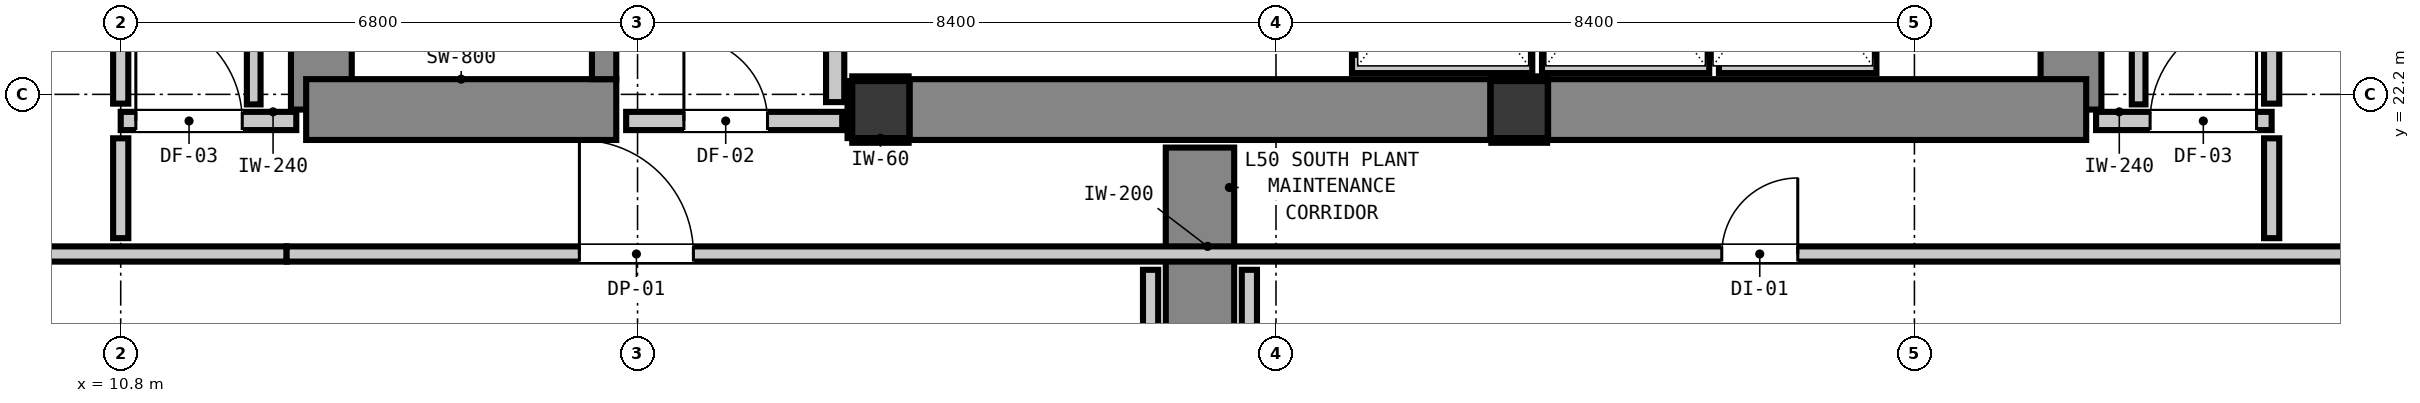
"""IFC4 building model, lengths in metres.
Left out: names, types, materials, properties, quantities, classifications, styles, units other than length and angle.
Written with IfcOpenShell. Run it as: python <this file> out.ifc"""

import sys

from ifc_helpers import new_model, si_unit, direction, frame, frame_2d, origin, origin_2d, place, context, subcontext, project, spatial, rectangle, extrude, element, fill, save


model = new_model("IFC4")
c1 = context("Model", 3, precision=1e-05, world=origin(), true_north=direction((0.0, 1.0)))
c2 = subcontext(c1, "Body", "Model", "MODEL_VIEW")
j1 = project(units=[si_unit("LENGTHUNIT", "METRE"), si_unit("PLANEANGLEUNIT", "RADIAN")], contexts=[c1])
p1 = place(None, origin())
s1 = spatial("IfcSite", under=j1, at=p1, CompositionType="ELEMENT")
p2 = place(p1, origin())
s2 = spatial("IfcBuilding", under=s1, at=p2, CompositionType="ELEMENT")
p3 = place(p2, frame((0.0, 0.0, 172.48)))
s3 = spatial("IfcBuildingStorey", under=s2, at=p3, CompositionType="ELEMENT", Elevation=172.48)
for number, where, z_axis, x_axis in (
    (1, (20.8, 22.0, 0.0), (0.0, 0.0, 1.0), (1.0, 0.0, 0.0)),
    (2, (29.2, 22.0, 0.0), (0.0, 0.0, 1.0), (1.0, 0.0, 0.0)),
):
    element("IfcColumn", number, at=place(p3, frame(where, z_axis=z_axis, x_axis=x_axis)), inside=s3, PredefinedType="COLUMN", context=c2, shape_type="SweptSolid", body=[
        extrude(rectangle(XDim=0.75, YDim=0.75, at=origin_2d()), origin(), (0.0, 0.0, 1.0), 4.4),
    ])
p4 = place(p3, frame((13.44, 22.0, 0.0), z_axis=(0.0, 0.0, 1.0), x_axis=(0.0, 1.0, 0.0)))
e3 = element("IfcWall", 3, at=p4, inside=s3, PredefinedType="SHEAR", context=c2, shape_type="SweptSolid", body=[
    extrude(rectangle(XDim=8.32, YDim=0.8, at=frame_2d((4.16, 0.0))), origin(), (0.0, 0.0, 1.0), 4.4),
])
p5 = place(p3, frame((13.24, 22.0, 0.0), z_axis=(0.0, 0.0, 1.0), x_axis=(1.0, 0.0, 0.0)))
e4 = element("IfcWall", 4, at=p5, inside=s3, PredefinedType="SHEAR", context=c2, shape_type="SweptSolid", body=[
    extrude(rectangle(XDim=4.08, YDim=0.8, at=frame_2d((2.04, 0.0))), origin(), (0.0, 0.0, 1.0), 4.4),
])
p6 = place(p3, frame((36.46, 22.0, 0.0), z_axis=(0.0, 0.0, 1.0), x_axis=(0.0, 1.0, 0.0)))
e5 = element("IfcWall", 5, at=p6, inside=s3, PredefinedType="SHEAR", context=c2, shape_type="SweptSolid", body=[
    extrude(rectangle(XDim=8.32, YDim=0.8, at=frame_2d((4.16, 0.0))), origin(), (0.0, 0.0, 1.0), 4.4),
])
p7 = place(p3, frame((29.58, 22.0, 0.0), z_axis=(0.0, 0.0, 1.0), x_axis=(1.0, 0.0, 0.0)))
e6 = element("IfcWall", 6, at=p7, inside=s3, PredefinedType="SHEAR", context=c2, shape_type="SweptSolid", body=[
    extrude(rectangle(XDim=7.08, YDim=0.8, at=frame_2d((3.54, 0.0))), origin(), (0.0, 0.0, 1.0), 4.4),
])
p8 = place(p3, frame((21.18, 22.0, 0.0), z_axis=(0.0, 0.0, 1.0), x_axis=(1.0, 0.0, 0.0)))
e7 = element("IfcWall", 7, at=p8, inside=s3, PredefinedType="SHEAR", context=c2, shape_type="SweptSolid", body=[
    extrude(rectangle(XDim=7.64, YDim=0.8, at=frame_2d((3.82, 0.0))), origin(), (0.0, 0.0, 1.0), 4.4),
])
p9 = place(p3, frame((17.16, 22.4, 0.0), z_axis=(0.0, 0.0, 1.0), x_axis=(0.0, 1.0, 0.0)))
e8 = element("IfcWall", 8, at=p9, inside=s3, PredefinedType="SHEAR", context=c2, shape_type="SweptSolid", body=[
    extrude(rectangle(XDim=8.0, YDim=0.32, at=frame_2d((4.0, 0.0))), origin(), (0.0, 0.0, 1.0), 4.4),
])
p10 = place(p9, frame((0.39, 0.0, 0.0)))
e9 = element("IfcOpeningElement", 9, at=p10, cuts=e8, PredefinedType="OPENING", context=c2, shape_type="SweptSolid", body=[
    extrude(rectangle(XDim=1.1, YDim=2.15, at=frame_2d((0.55, 1.075))), frame((0.0, 0.17, 0.0), z_axis=(0.0, -1.0, 0.0), x_axis=(1.0, 0.0, 0.0)), (0.0, 0.0, 1.0), 0.34),
])
p11 = place(p3, frame((25.0, 16.45, 0.0), z_axis=(0.0, 0.0, 1.0), x_axis=(0.0, 1.0, 0.0)))
e10 = element("IfcWall", 10, at=p11, inside=s3, PredefinedType="SHEAR", context=c2, shape_type="SweptSolid", body=[
    extrude(rectangle(XDim=5.05, YDim=0.9, at=frame_2d((2.525, 0.0))), origin(), (0.0, 0.0, 1.0), 4.16),
])
p12 = place(p3, frame((29.5, 22.6, 0.0), z_axis=(0.0, 0.0, 1.0), x_axis=(1.0, 0.0, 0.0)))
e11 = element("IfcWall", 11, at=p12, inside=s3, PredefinedType="PARTITIONING", context=c2, shape_type="SweptSolid", body=[
    extrude(rectangle(XDim=2.2, YDim=0.24, at=frame_2d((1.1, 0.0))), origin(), (0.0, 0.0, 1.0), 4.16),
])
p13 = place(p3, frame((31.828, 22.6, 0.0), z_axis=(0.0, 0.0, 1.0), x_axis=(1.0, 0.0, 0.0)))
e12 = element("IfcWall", 12, at=p13, inside=s3, PredefinedType="PARTITIONING", context=c2, shape_type="SweptSolid", body=[
    extrude(rectangle(XDim=2.072, YDim=0.24, at=frame_2d((1.036, 0.0))), origin(), (0.0, 0.0, 1.0), 4.16),
])
p14 = place(p3, frame((27.0, 22.6, 0.0), z_axis=(0.0, 0.0, 1.0), x_axis=(1.0, 0.0, 0.0)))
e13 = element("IfcWall", 13, at=p14, inside=s3, PredefinedType="PARTITIONING", context=c2, shape_type="SweptSolid", body=[
    extrude(rectangle(XDim=2.372, YDim=0.24, at=frame_2d((1.186, 0.0))), origin(), (0.0, 0.0, 1.0), 4.16),
])
p15 = place(p3, frame((10.8, 21.85, 0.0), z_axis=(0.0, 0.0, 1.0), x_axis=(1.0, 0.0, 0.0)))
e14 = element("IfcWall", 14, at=p15, inside=s3, PredefinedType="PARTITIONING", context=c2, shape_type="SweptSolid", body=[
    extrude(rectangle(XDim=2.31, YDim=0.24, at=frame_2d((1.155, 0.0))), origin(), (0.0, 0.0, 1.0), 3.842),
])
p16 = place(p15, frame((0.199, 0.0, 0.0)))
e15 = element("IfcOpeningElement", 15, at=p16, cuts=e14, PredefinedType="OPENING", context=c2, shape_type="SweptSolid", body=[
    extrude(rectangle(XDim=1.4, YDim=2.15, at=frame_2d((0.7, 1.075))), frame((0.0, 0.13, 0.0), z_axis=(0.0, -1.0, 0.0), x_axis=(1.0, 0.0, 0.0)), (0.0, 0.0, 1.0), 0.26),
])
p17 = place(p3, frame((17.45, 21.85, 0.0), z_axis=(0.0, 0.0, 1.0), x_axis=(1.0, 0.0, 0.0)))
e16 = element("IfcWall", 16, at=p17, inside=s3, PredefinedType="PARTITIONING", context=c2, shape_type="SweptSolid", body=[
    extrude(rectangle(XDim=2.843, YDim=0.24, at=frame_2d((1.421, 0.0))), origin(), (0.0, 0.0, 1.0), 3.842),
])
p18 = place(p17, frame((0.76, 0.0, 0.0)))
e17 = element("IfcOpeningElement", 17, at=p18, cuts=e16, PredefinedType="OPENING", context=c2, shape_type="SweptSolid", body=[
    extrude(rectangle(XDim=1.1, YDim=2.15, at=frame_2d((0.55, 1.075))), frame((0.0, 0.13, 0.0), z_axis=(0.0, -1.0, 0.0), x_axis=(1.0, 0.0, 0.0)), (0.0, 0.0, 1.0), 0.26),
])
p19 = place(p3, frame((36.79, 21.85, 0.0), z_axis=(0.0, 0.0, 1.0), x_axis=(1.0, 0.0, 0.0)))
e18 = element("IfcWall", 18, at=p19, inside=s3, PredefinedType="PARTITIONING", context=c2, shape_type="SweptSolid", body=[
    extrude(rectangle(XDim=2.31, YDim=0.24, at=frame_2d((1.155, 0.0))), origin(), (0.0, 0.0, 1.0), 3.842),
])
p20 = place(p19, frame((0.711, 0.0, 0.0)))
e19 = element("IfcOpeningElement", 19, at=p20, cuts=e18, PredefinedType="OPENING", context=c2, shape_type="SweptSolid", body=[
    extrude(rectangle(XDim=1.4, YDim=2.15, at=frame_2d((0.7, 1.075))), frame((0.0, 0.13, 0.0), z_axis=(0.0, -1.0, 0.0), x_axis=(1.0, 0.0, 0.0)), (0.0, 0.0, 1.0), 0.26),
])
p21 = place(p3, frame((4.35, 20.1, 0.0), z_axis=(0.0, 0.0, 1.0), x_axis=(1.0, 0.0, 0.0)))
e20 = element("IfcWall", 20, at=p21, inside=s3, PredefinedType="PARTITIONING", context=c2, shape_type="SweptSolid", body=[
    extrude(rectangle(XDim=8.633, YDim=0.2, at=frame_2d((4.316, 0.0))), origin(), (0.0, 0.0, 1.0), 3.645),
])
p22 = place(p3, frame((12.983, 20.1, 0.0), z_axis=(0.0, 0.0, 1.0), x_axis=(1.0, 0.0, 0.0)))
e21 = element("IfcWall", 21, at=p22, inside=s3, PredefinedType="PARTITIONING", context=c2, shape_type="SweptSolid", body=[
    extrude(rectangle(XDim=28.467, YDim=0.2, at=frame_2d((14.233, 0.0))), origin(), (0.0, 0.0, 1.0), 4.16),
])
p23 = place(p22, frame((18.882, 0.0, 0.0)))
e22 = element("IfcOpeningElement", 22, at=p23, cuts=e21, PredefinedType="OPENING", context=c2, shape_type="SweptSolid", body=[
    extrude(rectangle(XDim=1.0, YDim=2.15, at=frame_2d((0.5, 1.075))), frame((0.0, 0.11, 0.0), z_axis=(0.0, -1.0, 0.0), x_axis=(1.0, 0.0, 0.0)), (0.0, 0.0, 1.0), 0.22),
])
p24 = place(p22, frame((3.852, 0.0, 0.0)))
e23 = element("IfcOpeningElement", 23, at=p24, cuts=e21, PredefinedType="OPENING", context=c2, shape_type="SweptSolid", body=[
    extrude(rectangle(XDim=1.5, YDim=2.15, at=frame_2d((0.75, 1.075))), frame((0.0, 0.11, 0.0), z_axis=(0.0, -1.0, 0.0), x_axis=(1.0, 0.0, 0.0)), (0.0, 0.0, 1.0), 0.22),
])
p25 = place(p3, frame((20.2, 22.098, 0.0), z_axis=(0.0, 0.0, 1.0), x_axis=(0.0, 1.0, 0.0)))
e24 = element("IfcWall", 24, at=p25, inside=s3, PredefinedType="PARTITIONING", context=c2, shape_type="SweptSolid", body=[
    extrude(rectangle(XDim=6.054, YDim=0.24, at=frame_2d((3.027, 0.0))), origin(), (0.0, 0.0, 1.0), 4.16),
])
p26 = place(p3, frame((10.8, 20.308, 0.0), z_axis=(0.0, 0.0, 1.0), x_axis=(0.0, 1.0, 0.0)))
e25 = element("IfcWall", 25, at=p26, inside=s3, PredefinedType="PARTITIONING", context=c2, shape_type="SweptSolid", body=[
    extrude(rectangle(XDim=1.314, YDim=0.2, at=frame_2d((0.657, 0.0))), origin(), (0.0, 0.0, 1.0), 4.16),
])
p27 = place(p3, frame((10.8, 22.078, 0.0), z_axis=(0.0, 0.0, 1.0), x_axis=(0.0, 1.0, 0.0)))
e26 = element("IfcWall", 26, at=p27, inside=s3, PredefinedType="PARTITIONING", context=c2, shape_type="SweptSolid", body=[
    extrude(rectangle(XDim=0.914, YDim=0.2, at=frame_2d((0.457, 0.0))), origin(), (0.0, 0.0, 1.0), 4.16),
])
for number, where, z_axis, x_axis in (
    (27, (24.35, 16.758, 0.0), (0.0, 0.0, 1.0), (0.0, 1.0, 0.0)),
    (28, (25.65, 16.758, 0.0), (0.0, 0.0, 1.0), (0.0, 1.0, 0.0)),
):
    element("IfcWall", number, at=place(p3, frame(where, z_axis=z_axis, x_axis=x_axis)), inside=s3, PredefinedType="PARTITIONING", context=c2, shape_type="SweptSolid", body=[
        extrude(rectangle(XDim=3.134, YDim=0.2, at=frame_2d((1.567, 0.0))), origin(), (0.0, 0.0, 1.0), 4.16),
    ])
p28 = place(p3, frame((39.1, 20.308, 0.0), z_axis=(0.0, 0.0, 1.0), x_axis=(0.0, 1.0, 0.0)))
e29 = element("IfcWall", 29, at=p28, inside=s3, PredefinedType="PARTITIONING", context=c2, shape_type="SweptSolid", body=[
    extrude(rectangle(XDim=1.314, YDim=0.2, at=frame_2d((0.657, 0.0))), origin(), (0.0, 0.0, 1.0), 4.16),
])
p29 = place(p3, frame((39.1, 22.078, 0.0), z_axis=(0.0, 0.0, 1.0), x_axis=(0.0, 1.0, 0.0)))
e30 = element("IfcWall", 30, at=p29, inside=s3, PredefinedType="PARTITIONING", context=c2, shape_type="SweptSolid", body=[
    extrude(rectangle(XDim=0.914, YDim=0.2, at=frame_2d((0.457, 0.0))), origin(), (0.0, 0.0, 1.0), 4.16),
])
for number, where, z_axis, x_axis in (
    (31, (12.55, 22.068, 0.0), (0.0, 0.0, 1.0), (0.0, 1.0, 0.0)),
    (32, (37.35, 22.068, 0.0), (0.0, 0.0, 1.0), (0.0, 1.0, 0.0)),
):
    element("IfcWall", number, at=place(p3, frame(where, z_axis=z_axis, x_axis=x_axis)), inside=s3, PredefinedType="PARTITIONING", context=c2, shape_type="SweptSolid", body=[
        extrude(rectangle(XDim=17.294, YDim=0.18, at=frame_2d((8.647, 0.0))), origin(), (0.0, 0.0, 1.0), 4.16),
    ])
for number, where, z_axis, x_axis in (
    (33, (20.425, 21.593, 0.0), (0.0, 0.0, 1.0), (1.0, 0.0, 0.0)),
    (34, (20.425, 22.407, 0.0), (0.0, 0.0, 1.0), (1.0, 0.0, 0.0)),
):
    element("IfcWall", number, at=place(p3, frame(where, z_axis=z_axis, x_axis=x_axis)), inside=s3, PredefinedType="PARTITIONING", context=c2, shape_type="SweptSolid", body=[
        extrude(rectangle(XDim=0.742, YDim=0.06, at=frame_2d((0.371, 0.0))), origin(), (0.0, 0.0, 1.0), 1.45),
    ])
p30 = place(p3, frame((20.393, 21.625, 0.0), z_axis=(0.0, 0.0, 1.0), x_axis=(0.0, 1.0, 0.0)))
e35 = element("IfcWall", 35, at=p30, inside=s3, PredefinedType="PARTITIONING", context=c2, shape_type="SweptSolid", body=[
    extrude(rectangle(XDim=0.75, YDim=0.06, at=frame_2d((0.375, 0.0))), origin(), (0.0, 0.0, 1.0), 1.45),
])
for number, where, z_axis, x_axis in (
    (36, (28.833, 21.593, 0.0), (0.0, 0.0, 1.0), (1.0, 0.0, 0.0)),
    (37, (28.833, 22.407, 0.0), (0.0, 0.0, 1.0), (1.0, 0.0, 0.0)),
):
    element("IfcWall", number, at=place(p3, frame(where, z_axis=z_axis, x_axis=x_axis)), inside=s3, PredefinedType="PARTITIONING", context=c2, shape_type="SweptSolid", body=[
        extrude(rectangle(XDim=0.734, YDim=0.06, at=frame_2d((0.367, 0.0))), origin(), (0.0, 0.0, 1.0), 1.45),
    ])
p31 = place(p18, origin())
e38 = element("IfcDoor", 38, at=p31, inside=s3, OperationType="SINGLE_SWING_LEFT", PredefinedType="DOOR", context=c2, shape_type="SweptSolid", body=[
    extrude(rectangle(XDim=1.1, YDim=2.15, at=frame_2d((0.55, 1.075))), frame((0.0, 0.025, 0.0), z_axis=(0.0, -1.0, 0.0), x_axis=(1.0, 0.0, 0.0)), (0.0, 0.0, 1.0), 0.05),
])
fill(e17, e38)
p32 = place(p16, origin())
e39 = element("IfcDoor", 39, at=p32, inside=s3, OperationType="SINGLE_SWING_LEFT", PredefinedType="DOOR", context=c2, shape_type="SweptSolid", body=[
    extrude(rectangle(XDim=1.4, YDim=2.15, at=frame_2d((0.7, 1.075))), frame((0.0, 0.025, 0.0), z_axis=(0.0, -1.0, 0.0), x_axis=(1.0, 0.0, 0.0)), (0.0, 0.0, 1.0), 0.05),
])
fill(e15, e39)
p33 = place(p20, origin())
e40 = element("IfcDoor", 40, at=p33, inside=s3, OperationType="SINGLE_SWING_RIGHT", PredefinedType="DOOR", context=c2, shape_type="SweptSolid", body=[
    extrude(rectangle(XDim=1.4, YDim=2.15, at=frame_2d((0.7, 1.075))), frame((0.0, 0.025, 0.0), z_axis=(0.0, -1.0, 0.0), x_axis=(1.0, 0.0, 0.0)), (0.0, 0.0, 1.0), 0.05),
])
fill(e19, e40)
p34 = place(p23, origin())
e41 = element("IfcDoor", 41, at=p34, inside=s3, OperationType="SINGLE_SWING_RIGHT", PredefinedType="DOOR", context=c2, shape_type="SweptSolid", body=[
    extrude(rectangle(XDim=1.0, YDim=2.15, at=frame_2d((0.5, 1.075))), frame((0.0, 0.025, 0.0), z_axis=(0.0, -1.0, 0.0), x_axis=(1.0, 0.0, 0.0)), (0.0, 0.0, 1.0), 0.05),
])
fill(e22, e41)
p35 = place(p24, origin())
e42 = element("IfcDoor", 42, at=p35, inside=s3, OperationType="SINGLE_SWING_LEFT", PredefinedType="DOOR", context=c2, shape_type="SweptSolid", body=[
    extrude(rectangle(XDim=1.5, YDim=2.15, at=frame_2d((0.75, 1.075))), frame((0.0, 0.025, 0.0), z_axis=(0.0, -1.0, 0.0), x_axis=(1.0, 0.0, 0.0)), (0.0, 0.0, 1.0), 0.05),
])
fill(e23, e42)
save(model, sys.argv[1])
